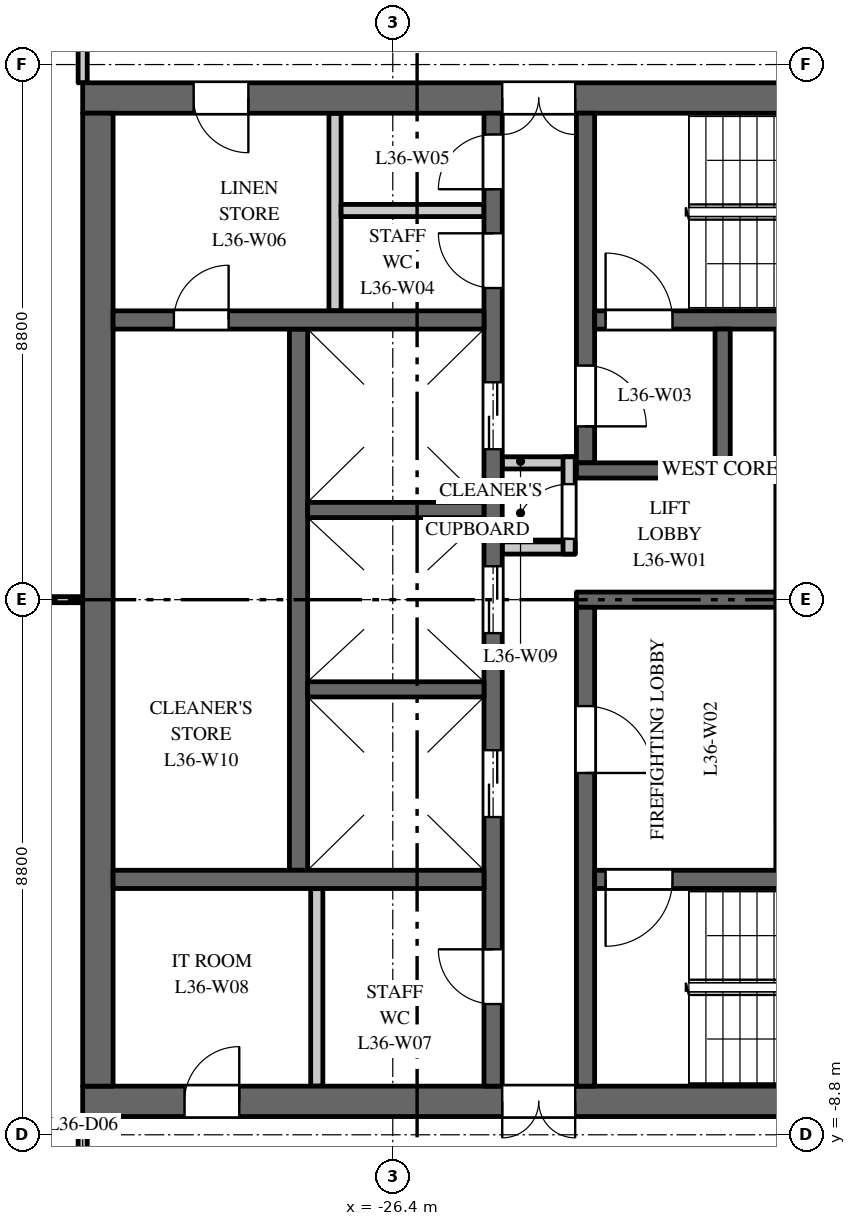
"""IFC4 building model, lengths in metres.
Left out: names, types, materials, properties, quantities, classifications, styles, units other than length and angle.
Written with IfcOpenShell. Run it as: python <this file> out.ifc"""

import sys

from ifc_helpers import new_model, si_unit, direction, frame, frame_2d, origin, place, context, subcontext, project, spatial, rectangle, extrude, element, fill, save


model = new_model("IFC4")
c1 = context("Model", 3, precision=1e-05, world=origin(), true_north=direction((0.0, 1.0)))
c2 = subcontext(c1, "Body", "Model", "MODEL_VIEW")
j1 = project(units=[si_unit("LENGTHUNIT", "METRE"), si_unit("PLANEANGLEUNIT", "RADIAN")], contexts=[c1])
p1 = place(None, origin())
s1 = spatial("IfcSite", under=j1, at=p1, CompositionType="ELEMENT")
p2 = place(p1, origin())
s2 = spatial("IfcBuilding", under=s1, at=p2, CompositionType="ELEMENT")
p3 = place(p2, frame((0.0, 0.0, 158.0)))
s3 = spatial("IfcBuildingStorey", under=s2, at=p3, CompositionType="ELEMENT", Elevation=158.0)
p4 = place(p3, frame((-16.5, 8.25, 0.0), z_axis=(0.0, 0.0, 1.0), x_axis=(-1.0, 0.0, 0.0)))
e1 = element("IfcWall", 1, at=p4, inside=s3, PredefinedType="SHEAR", context=c2, shape_type="SweptSolid", body=[
    extrude(rectangle(XDim=15.0, YDim=0.5, at=frame_2d((7.5, 0.0))), origin(), (0.0, 0.0, 1.0), 3.7),
])
p5 = place(p4, frame((6.9, 0.0, 0.0)))
e2 = element("IfcOpeningElement", 2, at=p5, cuts=e1, PredefinedType="OPENING", context=c2, shape_type="SweptSolid", body=[
    extrude(rectangle(XDim=1.2, YDim=2.1, at=frame_2d((0.6, 1.05))), frame((0.0, 0.26, 0.0), z_axis=(0.0, -1.0, 0.0), x_axis=(1.0, 0.0, 0.0)), (0.0, 0.0, 1.0), 0.52),
])
p6 = place(p4, frame((12.275, 0.0, 0.0)))
e3 = element("IfcOpeningElement", 3, at=p6, cuts=e1, PredefinedType="OPENING", context=c2, shape_type="SweptSolid", body=[
    extrude(rectangle(XDim=0.9, YDim=2.1, at=frame_2d((0.45, 1.05))), frame((0.0, 0.26, 0.0), z_axis=(0.0, -1.0, 0.0), x_axis=(1.0, 0.0, 0.0)), (0.0, 0.0, 1.0), 0.52),
])
p7 = place(p3, frame((-16.5, -8.25, 0.0), z_axis=(0.0, 0.0, 1.0), x_axis=(-1.0, 0.0, 0.0)))
e4 = element("IfcWall", 4, at=p7, inside=s3, PredefinedType="SHEAR", context=c2, shape_type="SweptSolid", body=[
    extrude(rectangle(XDim=15.0, YDim=0.5, at=frame_2d((7.5, 0.0))), origin(), (0.0, 0.0, 1.0), 3.7),
])
p8 = place(p7, frame((6.9, 0.0, 0.0)))
e5 = element("IfcOpeningElement", 5, at=p8, cuts=e4, PredefinedType="OPENING", context=c2, shape_type="SweptSolid", body=[
    extrude(rectangle(XDim=1.2, YDim=2.1, at=frame_2d((0.6, 1.05))), frame((0.0, 0.26, 0.0), z_axis=(0.0, -1.0, 0.0), x_axis=(1.0, 0.0, 0.0)), (0.0, 0.0, 1.0), 0.52),
])
p9 = place(p7, frame((12.425, 0.0, 0.0)))
e6 = element("IfcOpeningElement", 6, at=p9, cuts=e4, PredefinedType="OPENING", context=c2, shape_type="SweptSolid", body=[
    extrude(rectangle(XDim=0.9, YDim=2.1, at=frame_2d((0.45, 1.05))), frame((0.0, 0.26, 0.0), z_axis=(0.0, -1.0, 0.0), x_axis=(1.0, 0.0, 0.0)), (0.0, 0.0, 1.0), 0.52),
])
p10 = place(p3, frame((-27.95, -4.45, 0.0), z_axis=(0.0, 0.0, 1.0), x_axis=(0.0, 1.0, 0.0)))
e7 = element("IfcWall", 7, at=p10, inside=s3, PredefinedType="SHEAR", context=c2, shape_type="SweptSolid", body=[
    extrude(rectangle(XDim=8.9, YDim=0.3, at=frame_2d((4.45, 0.0))), origin(), (0.0, 0.0, 1.0), 3.7),
])
p11 = place(p3, frame((-24.75, -8.0, 0.0), z_axis=(0.0, 0.0, 1.0), x_axis=(0.0, 1.0, 0.0)))
e8 = element("IfcWall", 8, at=p11, inside=s3, PredefinedType="SHEAR", context=c2, shape_type="SweptSolid", body=[
    extrude(rectangle(XDim=16.0, YDim=0.3, at=frame_2d((8.0, 0.0))), origin(), (0.0, 0.0, 1.0), 3.7),
])
p12 = place(p11, frame((4.425, 0.0, 0.0)))
e9 = element("IfcOpeningElement", 9, at=p12, cuts=e8, PredefinedType="OPENING", context=c2, shape_type="SweptSolid", body=[
    extrude(rectangle(XDim=1.1, YDim=2.1, at=frame_2d((0.55, 1.05))), frame((0.0, 0.16, 0.0), z_axis=(0.0, -1.0, 0.0), x_axis=(1.0, 0.0, 0.0)), (0.0, 0.0, 1.0), 0.32),
])
p13 = place(p11, frame((7.45, 0.0, 0.0)))
e10 = element("IfcOpeningElement", 10, at=p13, cuts=e8, PredefinedType="OPENING", context=c2, shape_type="SweptSolid", body=[
    extrude(rectangle(XDim=1.1, YDim=2.1, at=frame_2d((0.55, 1.05))), frame((0.0, 0.16, 0.0), z_axis=(0.0, -1.0, 0.0), x_axis=(1.0, 0.0, 0.0)), (0.0, 0.0, 1.0), 0.32),
])
p14 = place(p11, frame((10.475, 0.0, 0.0)))
e11 = element("IfcOpeningElement", 11, at=p14, cuts=e8, PredefinedType="OPENING", context=c2, shape_type="SweptSolid", body=[
    extrude(rectangle(XDim=1.1, YDim=2.1, at=frame_2d((0.55, 1.05))), frame((0.0, 0.16, 0.0), z_axis=(0.0, -1.0, 0.0), x_axis=(1.0, 0.0, 0.0)), (0.0, 0.0, 1.0), 0.32),
])
p15 = place(p11, frame((13.125, 0.0, 0.0)))
e12 = element("IfcOpeningElement", 12, at=p15, cuts=e8, PredefinedType="OPENING", context=c2, shape_type="SweptSolid", body=[
    extrude(rectangle(XDim=0.9, YDim=2.1, at=frame_2d((0.45, 1.05))), frame((0.0, 0.16, 0.0), z_axis=(0.0, -1.0, 0.0), x_axis=(1.0, 0.0, 0.0)), (0.0, 0.0, 1.0), 0.32),
])
p16 = place(p11, frame((14.75, 0.0, 0.0)))
e13 = element("IfcOpeningElement", 13, at=p16, cuts=e8, PredefinedType="OPENING", context=c2, shape_type="SweptSolid", body=[
    extrude(rectangle(XDim=0.9, YDim=2.1, at=frame_2d((0.45, 1.05))), frame((0.0, 0.16, 0.0), z_axis=(0.0, -1.0, 0.0), x_axis=(1.0, 0.0, 0.0)), (0.0, 0.0, 1.0), 0.32),
])
p17 = place(p11, frame((1.35, 0.0, 0.0)))
e14 = element("IfcOpeningElement", 14, at=p17, cuts=e8, PredefinedType="OPENING", context=c2, shape_type="SweptSolid", body=[
    extrude(rectangle(XDim=0.9, YDim=2.1, at=frame_2d((0.45, 1.05))), frame((0.0, 0.16, 0.0), z_axis=(0.0, -1.0, 0.0), x_axis=(1.0, 0.0, 0.0)), (0.0, 0.0, 1.0), 0.32),
])
p18 = place(p3, frame((-20.1, 0.0, 0.0), z_axis=(0.0, 0.0, 1.0), x_axis=(-1.0, 0.0, 0.0)))
e15 = element("IfcWall", 15, at=p18, inside=s3, PredefinedType="SHEAR", context=c2, shape_type="SweptSolid", body=[
    extrude(rectangle(XDim=3.28, YDim=0.25, at=frame_2d((1.64, 0.0))), origin(), (0.0, 0.0, 1.0), 3.7),
])
for number, where, z_axis, x_axis in (
    (16, (-23.4, 0.85, 0.0), (0.0, 0.0, 1.0), (-1.0, 0.0, 0.0)),
    (17, (-23.4, 2.25, 0.0), (0.0, 0.0, 1.0), (-1.0, 0.0, 0.0)),
):
    element("IfcWall", number, at=place(p3, frame(where, z_axis=z_axis, x_axis=x_axis)), inside=s3, PredefinedType="PARTITIONING", context=c2, shape_type="SweptSolid", body=[
        extrude(rectangle(XDim=1.2, YDim=0.2, at=frame_2d((0.6, 0.0))), origin(), (0.0, 0.0, 1.0), 3.7),
    ])
p19 = place(p3, frame((-23.5, 0.75, 0.0), z_axis=(0.0, 0.0, 1.0), x_axis=(0.0, 1.0, 0.0)))
e18 = element("IfcWall", 18, at=p19, inside=s3, PredefinedType="PARTITIONING", context=c2, shape_type="SweptSolid", body=[
    extrude(rectangle(XDim=1.6, YDim=0.2, at=frame_2d((0.8, 0.0))), origin(), (0.0, 0.0, 1.0), 3.7),
])
p20 = place(p19, frame((0.25, 0.0, 0.0)))
e19 = element("IfcOpeningElement", 19, at=p20, cuts=e18, PredefinedType="OPENING", context=c2, shape_type="SweptSolid", body=[
    extrude(rectangle(XDim=0.9, YDim=2.1, at=frame_2d((0.45, 1.05))), frame((0.0, 0.11, 0.0), z_axis=(0.0, -1.0, 0.0), x_axis=(1.0, 0.0, 0.0)), (0.0, 0.0, 1.0), 0.22),
])
p21 = place(p3, frame((-31.25, -8.0, 0.0), z_axis=(0.0, 0.0, 1.0), x_axis=(0.0, 1.0, 0.0)))
e20 = element("IfcWall", 20, at=p21, inside=s3, PredefinedType="SHEAR", context=c2, shape_type="SweptSolid", body=[
    extrude(rectangle(XDim=16.0, YDim=0.5, at=frame_2d((8.0, 0.0))), origin(), (0.0, 0.0, 1.0), 3.7),
])
p22 = place(p3, frame((-24.9, 4.6, 0.0), z_axis=(0.0, 0.0, 1.0), x_axis=(-1.0, 0.0, 0.0)))
e21 = element("IfcWall", 21, at=p22, inside=s3, PredefinedType="SHEAR", context=c2, shape_type="SweptSolid", body=[
    extrude(rectangle(XDim=6.1, YDim=0.3, at=frame_2d((3.05, 0.0))), origin(), (0.0, 0.0, 1.0), 3.7),
])
p23 = place(p22, frame((4.2, 0.0, 0.0)))
e22 = element("IfcOpeningElement", 22, at=p23, cuts=e21, PredefinedType="OPENING", context=c2, shape_type="SweptSolid", body=[
    extrude(rectangle(XDim=0.9, YDim=2.1, at=frame_2d((0.45, 1.05))), frame((0.0, 0.16, 0.0), z_axis=(0.0, -1.0, 0.0), x_axis=(1.0, 0.0, 0.0)), (0.0, 0.0, 1.0), 0.32),
])
for number, where, z_axis, x_axis in (
    (23, (-27.35, 4.75, 0.0), (0.0, 0.0, 1.0), (0.0, 1.0, 0.0)),
    (24, (-27.65, -8.0, 0.0), (0.0, 0.0, 1.0), (0.0, 1.0, 0.0)),
):
    element("IfcWall", number, at=place(p3, frame(where, z_axis=z_axis, x_axis=x_axis)), inside=s3, PredefinedType="PARTITIONING", context=c2, shape_type="SweptSolid", body=[
        extrude(rectangle(XDim=3.25, YDim=0.2, at=frame_2d((1.625, 0.0))), origin(), (0.0, 0.0, 1.0), 3.7),
    ])
p24 = place(p3, frame((-24.9, 6.4, 0.0), z_axis=(0.0, 0.0, 1.0), x_axis=(-1.0, 0.0, 0.0)))
e25 = element("IfcWall", 25, at=p24, inside=s3, PredefinedType="PARTITIONING", context=c2, shape_type="SweptSolid", body=[
    extrude(rectangle(XDim=2.35, YDim=0.2, at=frame_2d((1.175, 0.0))), origin(), (0.0, 0.0, 1.0), 3.7),
])
p25 = place(p3, frame((-24.9, -4.6, 0.0), z_axis=(0.0, 0.0, 1.0), x_axis=(-1.0, 0.0, 0.0)))
e26 = element("IfcWall", 26, at=p25, inside=s3, PredefinedType="SHEAR", context=c2, shape_type="SweptSolid", body=[
    extrude(rectangle(XDim=6.1, YDim=0.3, at=frame_2d((3.05, 0.0))), origin(), (0.0, 0.0, 1.0), 3.7),
])
for number, where, z_axis, x_axis in (
    (27, (-24.9, -1.475, 0.0), (0.0, 0.0, 1.0), (-1.0, 0.0, 0.0)),
    (28, (-24.9, 1.475, 0.0), (0.0, 0.0, 1.0), (-1.0, 0.0, 0.0)),
):
    element("IfcWall", number, at=place(p3, frame(where, z_axis=z_axis, x_axis=x_axis)), inside=s3, PredefinedType="SHEAR", context=c2, shape_type="SweptSolid", body=[
        extrude(rectangle(XDim=2.9, YDim=0.25, at=frame_2d((1.45, 0.0))), origin(), (0.0, 0.0, 1.0), 3.7),
    ])
p26 = place(p3, frame((-23.23, 2.25, 0.0), z_axis=(0.0, 0.0, 1.0), x_axis=(0.0, 1.0, 0.0)))
e29 = element("IfcWall", 29, at=p26, inside=s3, PredefinedType="SHEAR", context=c2, shape_type="SweptSolid", body=[
    extrude(rectangle(XDim=5.75, YDim=0.3, at=frame_2d((2.875, 0.0))), origin(), (0.0, 0.0, 1.0), 3.7),
])
p27 = place(p26, frame((0.6, 0.0, 0.0)))
e30 = element("IfcOpeningElement", 30, at=p27, cuts=e29, PredefinedType="OPENING", context=c2, shape_type="SweptSolid", body=[
    extrude(rectangle(XDim=1.0, YDim=2.1, at=frame_2d((0.5, 1.05))), frame((0.0, 0.16, 0.0), z_axis=(0.0, -1.0, 0.0), x_axis=(1.0, 0.0, 0.0)), (0.0, 0.0, 1.0), 0.32),
])
p28 = place(p3, frame((-23.23, -8.0, 0.0), z_axis=(0.0, 0.0, 1.0), x_axis=(0.0, 1.0, 0.0)))
e31 = element("IfcWall", 31, at=p28, inside=s3, PredefinedType="SHEAR", context=c2, shape_type="SweptSolid", body=[
    extrude(rectangle(XDim=7.875, YDim=0.3, at=frame_2d((3.938, 0.0))), origin(), (0.0, 0.0, 1.0), 3.7),
])
p29 = place(p28, frame((5.15, 0.0, 0.0)))
e32 = element("IfcOpeningElement", 32, at=p29, cuts=e31, PredefinedType="OPENING", context=c2, shape_type="SweptSolid", body=[
    extrude(rectangle(XDim=1.1, YDim=2.1, at=frame_2d((0.55, 1.05))), frame((0.0, 0.16, 0.0), z_axis=(0.0, -1.0, 0.0), x_axis=(1.0, 0.0, 0.0)), (0.0, 0.0, 1.0), 0.32),
])
p30 = place(p3, frame((-16.9, 4.6, 0.0), z_axis=(0.0, 0.0, 1.0), x_axis=(-1.0, 0.0, 0.0)))
e33 = element("IfcWall", 33, at=p30, inside=s3, PredefinedType="SHEAR", context=c2, shape_type="SweptSolid", body=[
    extrude(rectangle(XDim=6.18, YDim=0.3, at=frame_2d((3.09, 0.0))), origin(), (0.0, 0.0, 1.0), 3.7),
])
p31 = place(p30, frame((4.9, 0.0, 0.0)))
e34 = element("IfcOpeningElement", 34, at=p31, cuts=e33, PredefinedType="OPENING", context=c2, shape_type="SweptSolid", body=[
    extrude(rectangle(XDim=1.1, YDim=2.1, at=frame_2d((0.55, 1.05))), frame((0.0, 0.16, 0.0), z_axis=(0.0, -1.0, 0.0), x_axis=(1.0, 0.0, 0.0)), (0.0, 0.0, 1.0), 0.32),
])
p32 = place(p3, frame((-16.9, -4.6, 0.0), z_axis=(0.0, 0.0, 1.0), x_axis=(-1.0, 0.0, 0.0)))
e35 = element("IfcWall", 35, at=p32, inside=s3, PredefinedType="SHEAR", context=c2, shape_type="SweptSolid", body=[
    extrude(rectangle(XDim=6.18, YDim=0.3, at=frame_2d((3.09, 0.0))), origin(), (0.0, 0.0, 1.0), 3.7),
])
p33 = place(p32, frame((4.9, 0.0, 0.0)))
e36 = element("IfcOpeningElement", 36, at=p33, cuts=e35, PredefinedType="OPENING", context=c2, shape_type="SweptSolid", body=[
    extrude(rectangle(XDim=1.1, YDim=2.1, at=frame_2d((0.55, 1.05))), frame((0.0, 0.16, 0.0), z_axis=(0.0, -1.0, 0.0), x_axis=(1.0, 0.0, 0.0)), (0.0, 0.0, 1.0), 0.32),
])
p34 = place(p3, frame((-20.85, 2.125, 0.0), z_axis=(0.0, 0.0, 1.0), x_axis=(-1.0, 0.0, 0.0)))
e37 = element("IfcWall", 37, at=p34, inside=s3, PredefinedType="SHEAR", context=c2, shape_type="SweptSolid", body=[
    extrude(rectangle(XDim=2.53, YDim=0.25, at=frame_2d((1.265, 0.0))), origin(), (0.0, 0.0, 1.0), 3.7),
])
p35 = place(p3, frame((-20.975, 2.25, 0.0), z_axis=(0.0, 0.0, 1.0), x_axis=(0.0, 1.0, 0.0)))
e38 = element("IfcWall", 38, at=p35, inside=s3, PredefinedType="SHEAR", context=c2, shape_type="SweptSolid", body=[
    extrude(rectangle(XDim=2.2, YDim=0.25, at=frame_2d((1.1, 0.0))), origin(), (0.0, 0.0, 1.0), 3.7),
])
p36 = place(p3, frame((-35.949, 0.0, 0.0), z_axis=(0.0, 0.0, 1.0), x_axis=(1.0, 0.0, 0.0)))
e39 = element("IfcWall", 39, at=p36, inside=s3, PredefinedType="PARTITIONING", context=c2, shape_type="SweptSolid", body=[
    extrude(rectangle(XDim=4.449, YDim=0.1, at=frame_2d((2.225, 0.0))), origin(), (0.0, 0.0, 1.0), 2.9),
])
p37 = place(p3, frame((-31.5, -10.7, 0.0), z_axis=(0.0, 0.0, 1.0), x_axis=(0.0, 1.0, 0.0)))
e40 = element("IfcWall", 40, at=p37, inside=s3, PredefinedType="PARTITIONING", context=c2, shape_type="SweptSolid", body=[
    extrude(rectangle(XDim=2.2, YDim=0.15, at=frame_2d((1.1, 0.0))), origin(), (0.0, 0.0, 1.0), 3.7),
])
p38 = place(p37, frame((0.55, 0.0, 0.0)))
e41 = element("IfcOpeningElement", 41, at=p38, cuts=e40, PredefinedType="OPENING", context=c2, shape_type="SweptSolid", body=[
    extrude(rectangle(XDim=1.0, YDim=2.1, at=frame_2d((0.5, 1.05))), frame((0.0, 0.085, 0.0), z_axis=(0.0, -1.0, 0.0), x_axis=(1.0, 0.0, 0.0)), (0.0, 0.0, 1.0), 0.17),
])
p39 = place(p3, frame((-31.5, 8.5, 0.0), z_axis=(0.0, 0.0, 1.0), x_axis=(0.0, 1.0, 0.0)))
e42 = element("IfcWall", 42, at=p39, inside=s3, PredefinedType="PARTITIONING", context=c2, shape_type="SweptSolid", body=[
    extrude(rectangle(XDim=2.2, YDim=0.15, at=frame_2d((1.1, 0.0))), origin(), (0.0, 0.0, 1.0), 3.7),
])
p40 = place(p39, frame((0.55, 0.0, 0.0)))
e43 = element("IfcOpeningElement", 43, at=p40, cuts=e42, PredefinedType="OPENING", context=c2, shape_type="SweptSolid", body=[
    extrude(rectangle(XDim=1.0, YDim=2.1, at=frame_2d((0.5, 1.05))), frame((0.0, 0.085, 0.0), z_axis=(0.0, -1.0, 0.0), x_axis=(1.0, 0.0, 0.0)), (0.0, 0.0, 1.0), 0.17),
])
p41 = place(p12, origin())
e44 = element("IfcDoor", 44, at=p41, inside=s3, OperationType="DOUBLE_DOOR_SLIDING", PredefinedType="DOOR", context=c2, shape_type="SweptSolid", body=[
    extrude(rectangle(XDim=1.1, YDim=2.1, at=frame_2d((0.55, 1.05))), frame((0.0, 0.025, 0.0), z_axis=(0.0, -1.0, 0.0), x_axis=(1.0, 0.0, 0.0)), (0.0, 0.0, 1.0), 0.05),
])
fill(e9, e44)
p42 = place(p13, origin())
e45 = element("IfcDoor", 45, at=p42, inside=s3, OperationType="DOUBLE_DOOR_SLIDING", PredefinedType="DOOR", context=c2, shape_type="SweptSolid", body=[
    extrude(rectangle(XDim=1.1, YDim=2.1, at=frame_2d((0.55, 1.05))), frame((0.0, 0.025, 0.0), z_axis=(0.0, -1.0, 0.0), x_axis=(1.0, 0.0, 0.0)), (0.0, 0.0, 1.0), 0.05),
])
fill(e10, e45)
p43 = place(p14, origin())
e46 = element("IfcDoor", 46, at=p43, inside=s3, OperationType="DOUBLE_DOOR_SLIDING", PredefinedType="DOOR", context=c2, shape_type="SweptSolid", body=[
    extrude(rectangle(XDim=1.1, YDim=2.1, at=frame_2d((0.55, 1.05))), frame((0.0, 0.025, 0.0), z_axis=(0.0, -1.0, 0.0), x_axis=(1.0, 0.0, 0.0)), (0.0, 0.0, 1.0), 0.05),
])
fill(e11, e46)
p44 = place(p31, origin())
e47 = element("IfcDoor", 47, at=p44, inside=s3, OperationType="SINGLE_SWING_RIGHT", PredefinedType="DOOR", context=c2, shape_type="SweptSolid", body=[
    extrude(rectangle(XDim=1.1, YDim=2.1, at=frame_2d((0.55, 1.05))), frame((0.0, 0.025, 0.0), z_axis=(0.0, -1.0, 0.0), x_axis=(1.0, 0.0, 0.0)), (0.0, 0.0, 1.0), 0.05),
])
fill(e34, e47)
p45 = place(p33, origin())
e48 = element("IfcDoor", 48, at=p45, inside=s3, OperationType="SINGLE_SWING_LEFT", PredefinedType="DOOR", context=c2, shape_type="SweptSolid", body=[
    extrude(rectangle(XDim=1.1, YDim=2.1, at=frame_2d((0.55, 1.05))), frame((0.0, 0.025, 0.0), z_axis=(0.0, -1.0, 0.0), x_axis=(1.0, 0.0, 0.0)), (0.0, 0.0, 1.0), 0.05),
])
fill(e36, e48)
p46 = place(p29, origin())
e49 = element("IfcDoor", 49, at=p46, inside=s3, OperationType="SINGLE_SWING_LEFT", PredefinedType="DOOR", context=c2, shape_type="SweptSolid", body=[
    extrude(rectangle(XDim=1.1, YDim=2.1, at=frame_2d((0.55, 1.05))), frame((0.0, 0.025, 0.0), z_axis=(0.0, -1.0, 0.0), x_axis=(1.0, 0.0, 0.0)), (0.0, 0.0, 1.0), 0.05),
])
fill(e32, e49)
p47 = place(p27, origin())
e50 = element("IfcDoor", 50, at=p47, inside=s3, OperationType="SINGLE_SWING_LEFT", PredefinedType="DOOR", context=c2, shape_type="SweptSolid", body=[
    extrude(rectangle(XDim=1.0, YDim=2.1, at=frame_2d((0.5, 1.05))), frame((0.0, 0.025, 0.0), z_axis=(0.0, -1.0, 0.0), x_axis=(1.0, 0.0, 0.0)), (0.0, 0.0, 1.0), 0.05),
])
fill(e30, e50)
p48 = place(p5, origin())
e51 = element("IfcDoor", 51, at=p48, inside=s3, OperationType="DOUBLE_DOOR_DOUBLE_SWING", PredefinedType="DOOR", context=c2, shape_type="SweptSolid", body=[
    extrude(rectangle(XDim=1.2, YDim=2.1, at=frame_2d((0.6, 1.05))), frame((0.0, 0.025, 0.0), z_axis=(0.0, -1.0, 0.0), x_axis=(1.0, 0.0, 0.0)), (0.0, 0.0, 1.0), 0.05),
])
fill(e2, e51)
p49 = place(p8, origin())
e52 = element("IfcDoor", 52, at=p49, inside=s3, OperationType="DOUBLE_DOOR_DOUBLE_SWING", PredefinedType="DOOR", context=c2, shape_type="SweptSolid", body=[
    extrude(rectangle(XDim=1.2, YDim=2.1, at=frame_2d((0.6, 1.05))), frame((0.0, 0.025, 0.0), z_axis=(0.0, -1.0, 0.0), x_axis=(1.0, 0.0, 0.0)), (0.0, 0.0, 1.0), 0.05),
])
fill(e5, e52)
p50 = place(p15, origin())
e53 = element("IfcDoor", 53, at=p50, inside=s3, OperationType="SINGLE_SWING_LEFT", PredefinedType="DOOR", context=c2, shape_type="SweptSolid", body=[
    extrude(rectangle(XDim=0.9, YDim=2.1, at=frame_2d((0.45, 1.05))), frame((0.0, 0.025, 0.0), z_axis=(0.0, -1.0, 0.0), x_axis=(1.0, 0.0, 0.0)), (0.0, 0.0, 1.0), 0.05),
])
fill(e12, e53)
p51 = place(p16, origin())
e54 = element("IfcDoor", 54, at=p51, inside=s3, OperationType="SINGLE_SWING_RIGHT", PredefinedType="DOOR", context=c2, shape_type="SweptSolid", body=[
    extrude(rectangle(XDim=0.9, YDim=2.1, at=frame_2d((0.45, 1.05))), frame((0.0, 0.025, 0.0), z_axis=(0.0, -1.0, 0.0), x_axis=(1.0, 0.0, 0.0)), (0.0, 0.0, 1.0), 0.05),
])
fill(e13, e54)
p52 = place(p6, origin())
e55 = element("IfcDoor", 55, at=p52, inside=s3, OperationType="SINGLE_SWING_RIGHT", PredefinedType="DOOR", context=c2, shape_type="SweptSolid", body=[
    extrude(rectangle(XDim=0.9, YDim=2.1, at=frame_2d((0.45, 1.05))), frame((0.0, 0.025, 0.0), z_axis=(0.0, -1.0, 0.0), x_axis=(1.0, 0.0, 0.0)), (0.0, 0.0, 1.0), 0.05),
])
fill(e3, e55)
p53 = place(p17, origin())
e56 = element("IfcDoor", 56, at=p53, inside=s3, OperationType="SINGLE_SWING_LEFT", PredefinedType="DOOR", context=c2, shape_type="SweptSolid", body=[
    extrude(rectangle(XDim=0.9, YDim=2.1, at=frame_2d((0.45, 1.05))), frame((0.0, 0.025, 0.0), z_axis=(0.0, -1.0, 0.0), x_axis=(1.0, 0.0, 0.0)), (0.0, 0.0, 1.0), 0.05),
])
fill(e14, e56)
p54 = place(p9, origin())
e57 = element("IfcDoor", 57, at=p54, inside=s3, OperationType="SINGLE_SWING_LEFT", PredefinedType="DOOR", context=c2, shape_type="SweptSolid", body=[
    extrude(rectangle(XDim=0.9, YDim=2.1, at=frame_2d((0.45, 1.05))), frame((0.0, 0.025, 0.0), z_axis=(0.0, -1.0, 0.0), x_axis=(1.0, 0.0, 0.0)), (0.0, 0.0, 1.0), 0.05),
])
fill(e6, e57)
p55 = place(p20, origin())
e58 = element("IfcDoor", 58, at=p55, inside=s3, OperationType="SINGLE_SWING_RIGHT", PredefinedType="DOOR", context=c2, shape_type="SweptSolid", body=[
    extrude(rectangle(XDim=0.9, YDim=2.1, at=frame_2d((0.45, 1.05))), frame((0.0, 0.025, 0.0), z_axis=(0.0, -1.0, 0.0), x_axis=(1.0, 0.0, 0.0)), (0.0, 0.0, 1.0), 0.05),
])
fill(e19, e58)
p56 = place(p23, origin())
e59 = element("IfcDoor", 59, at=p56, inside=s3, OperationType="SINGLE_SWING_LEFT", PredefinedType="DOOR", context=c2, shape_type="SweptSolid", body=[
    extrude(rectangle(XDim=0.9, YDim=2.1, at=frame_2d((0.45, 1.05))), frame((0.0, 0.025, 0.0), z_axis=(0.0, -1.0, 0.0), x_axis=(1.0, 0.0, 0.0)), (0.0, 0.0, 1.0), 0.05),
])
fill(e22, e59)
save(model, sys.argv[1])
